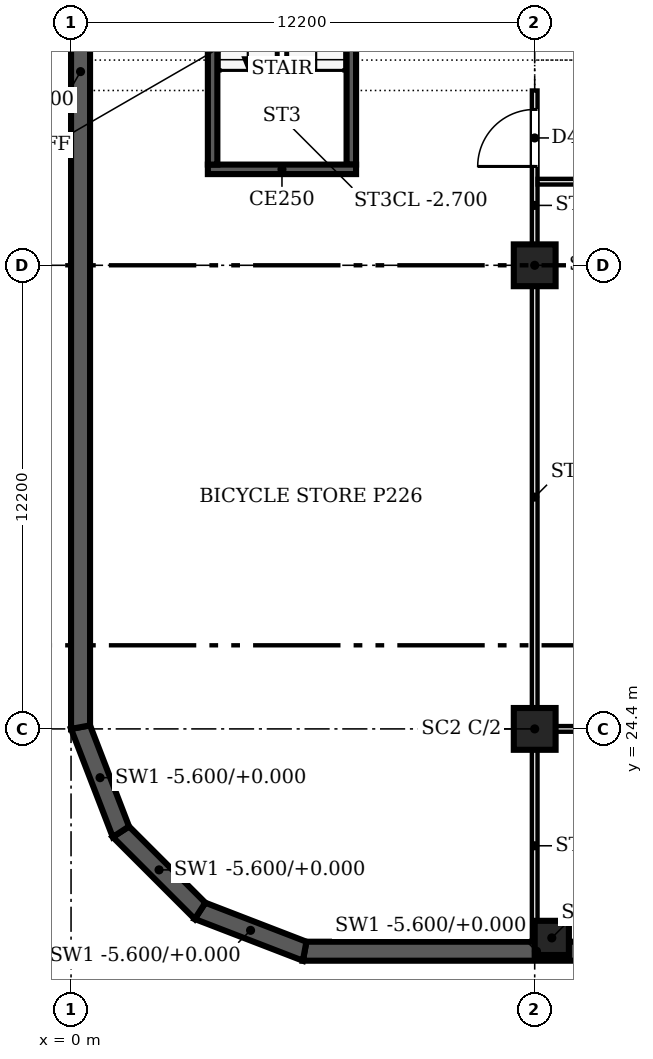
"""IFC4 building model, lengths in metres.
Left out: names, types, materials, properties, quantities, classifications, styles, units other than length and angle.
Written with IfcOpenShell. Run it as: python <this file> out.ifc"""

import sys

from ifc_helpers import new_model, si_unit, direction, frame, frame_2d, origin, origin_2d, place, context, subcontext, project, spatial, polyline, rectangle, outline, extrude, source, transform, mapped, element, fill, save


model = new_model("IFC4")
c1 = context("Model", 3, precision=1e-05, world=origin(), true_north=direction((0.0, 1.0)))
c2 = subcontext(c1, "Body", "Model", "MODEL_VIEW")
j1 = project(units=[si_unit("LENGTHUNIT", "METRE"), si_unit("PLANEANGLEUNIT", "RADIAN")], contexts=[c1])
p1 = place(None, origin())
s1 = spatial("IfcSite", under=j1, at=p1, CompositionType="ELEMENT")
p2 = place(p1, origin())
s2 = spatial("IfcBuilding", under=s1, at=p2, CompositionType="ELEMENT")
p3 = place(p2, frame((0.0, 0.0, -5.4)))
s3 = spatial("IfcBuildingStorey", under=s2, at=p3, CompositionType="ELEMENT", Elevation=-5.4)
p4 = place(p3, frame((0.0, 0.0, -0.2)))
e1 = element("IfcWall", 1, at=p4, inside=s3, PredefinedType="SOLIDWALL", context=c2, shape_type="SweptSolid", body=[
    extrude(outline(polyline([(6.1, 18.3), (18.3, 18.3), (18.393, 18.8), (6.193, 18.8), (6.1, 18.3)])), origin(), (0.0, 0.0, 1.0), 5.6),
])
p5 = place(p3, frame((0.0, 0.0, -0.2)))
e2 = element("IfcWall", 2, at=p5, inside=s3, PredefinedType="SOLIDWALL", context=c2, shape_type="SweptSolid", body=[
    extrude(outline(polyline([(3.254, 19.398), (6.1, 18.3), (6.193, 18.8), (3.533, 19.826), (3.254, 19.398)])), origin(), (0.0, 0.0, 1.0), 5.6),
])
p6 = place(p3, frame((0.0, 0.0, -0.2)))
e3 = element("IfcWall", 3, at=p6, inside=s3, PredefinedType="SOLIDWALL", context=c2, shape_type="SweptSolid", body=[
    extrude(outline(polyline([(1.098, 21.554), (3.254, 19.398), (3.533, 19.826), (1.526, 21.833), (1.098, 21.554)])), origin(), (0.0, 0.0, 1.0), 5.6),
])
p7 = place(p3, frame((0.0, 0.0, -0.2)))
e4 = element("IfcWall", 4, at=p7, inside=s3, PredefinedType="SOLIDWALL", context=c2, shape_type="SweptSolid", body=[
    extrude(outline(polyline([(0.0, 24.4), (1.098, 21.554), (1.526, 21.833), (0.5, 24.493), (0.0, 24.4)])), origin(), (0.0, 0.0, 1.0), 5.6),
])
p8 = place(p3, frame((0.0, 0.0, -0.2)))
e5 = element("IfcWall", 5, at=p8, inside=s3, PredefinedType="SOLIDWALL", context=c2, shape_type="SweptSolid", body=[
    extrude(outline(polyline([(0.0, 24.4), (0.5, 24.493), (0.5, 58.9), (0.0, 59.4), (0.0, 24.4)])), origin(), (0.0, 0.0, 1.0), 5.6),
])
for number, where, z_axis, x_axis in (
    (6, (12.2, 24.4, 0.0), (0.0, 0.0, 1.0), (1.0, 0.0, 0.0)),
    (7, (12.2, 36.6, 0.0), (0.0, 0.0, 1.0), (1.0, 0.0, 0.0)),
):
    element("IfcColumn", number, at=place(p3, frame(where, z_axis=z_axis, x_axis=x_axis)), inside=s3, PredefinedType="COLUMN", context=c2, shape_type="SweptSolid", body=[
        extrude(rectangle(XDim=1.1, YDim=1.1, at=origin_2d()), origin(), (0.0, 0.0, 1.0), 5.15),
    ])
p9 = place(p3, frame((12.65, 18.9, 0.0), z_axis=(0.0, 0.0, 1.0), x_axis=(1.0, 0.0, 0.0)))
e8 = element("IfcColumn", 8, at=p9, inside=s3, PredefinedType="COLUMN", context=c2, shape_type="SweptSolid", body=[
    extrude(rectangle(XDim=0.9, YDim=0.9, at=origin_2d()), origin(), (0.0, 0.0, 1.0), 5.15),
])
p10 = place(p3, frame((7.5, 39.125, 0.0), z_axis=(0.0, 0.0, 1.0), x_axis=(-1.0, 0.0, 0.0)))
e9 = element("IfcWall", 9, at=p10, inside=s3, PredefinedType="SOLIDWALL", context=c2, shape_type="SweptSolid", body=[
    extrude(rectangle(XDim=3.9, YDim=0.25, at=frame_2d((1.95, 0.0))), origin(), (0.0, 0.0, 1.0), 5.4),
])
p11 = place(p3, frame((3.725, 39.25, 0.0), z_axis=(0.0, 0.0, 1.0), x_axis=(0.0, 1.0, 0.0)))
e10 = element("IfcWall", 10, at=p11, inside=s3, PredefinedType="SOLIDWALL", context=c2, shape_type="SweptSolid", body=[
    extrude(rectangle(XDim=8.0, YDim=0.25, at=frame_2d((4.0, 0.0))), origin(), (0.0, 0.0, 1.0), 5.4),
])
p12 = place(p3, frame((7.375, 47.25, 0.0), z_axis=(0.0, 0.0, 1.0), x_axis=(0.0, -1.0, 0.0)))
e11 = element("IfcWall", 11, at=p12, inside=s3, PredefinedType="SOLIDWALL", context=c2, shape_type="SweptSolid", body=[
    extrude(rectangle(XDim=8.0, YDim=0.25, at=frame_2d((4.0, 0.0))), origin(), (0.0, 0.0, 1.0), 5.4),
])
m1 = source(origin(), c2, "Body", "SweptSolid", [
    extrude(rectangle(XDim=1.2, YDim=2.1, at=frame_2d((0.6, 1.05))), frame((0.0, 0.135, 0.0), z_axis=(0.0, -1.0, 0.0), x_axis=(1.0, 0.0, 0.0)), (0.0, 0.0, 1.0), 0.27),
])
p13 = place(p12, frame((0.15, 0.0, 0.0)))
e12 = element("IfcOpeningElement", 12, at=p13, cuts=e11, PredefinedType="OPENING", context=c2, shape_type="MappedRepresentation", body=[
    mapped(m1, transform((0.0, 0.0, 0.0), scale=1.0)),
])
p14 = place(p3, frame((12.2, 18.8, 0.0), z_axis=(0.0, 0.0, 1.0), x_axis=(0.0, 1.0, 0.0)))
e13 = element("IfcWall", 13, at=p14, inside=s3, PredefinedType="PARTITIONING", context=c2, shape_type="SweptSolid", body=[
    extrude(rectangle(XDim=5.049, YDim=0.15, at=frame_2d((2.524, 0.0))), origin(), (0.0, 0.0, 1.0), 4.315),
])
for number, where, z_axis, x_axis in (
    (14, (12.751, 24.4, 0.0), (0.0, 0.0, 1.0), (1.0, 0.0, 0.0)),
    (15, (12.2, 24.951, 0.0), (0.0, 0.0, 1.0), (0.0, 1.0, 0.0)),
):
    element("IfcWall", number, at=place(p3, frame(where, z_axis=z_axis, x_axis=x_axis)), inside=s3, PredefinedType="PARTITIONING", context=c2, shape_type="SweptSolid", body=[
        extrude(rectangle(XDim=11.098, YDim=0.15, at=frame_2d((5.549, 0.0))), origin(), (0.0, 0.0, 1.0), 4.315),
    ])
p15 = place(p3, frame((12.2, 37.151, 0.0), z_axis=(0.0, 0.0, 1.0), x_axis=(0.0, 1.0, 0.0)))
e16 = element("IfcWall", 16, at=p15, inside=s3, PredefinedType="PARTITIONING", context=c2, shape_type="SweptSolid", body=[
    extrude(rectangle(XDim=4.049, YDim=0.15, at=frame_2d((2.024, 0.0))), origin(), (0.0, 0.0, 1.0), 4.315),
])
m2 = source(origin(), c2, "Body", "SweptSolid", [
    extrude(rectangle(XDim=1.5, YDim=2.1, at=frame_2d((0.75, 1.05))), frame((0.0, 0.085, 0.0), z_axis=(0.0, -1.0, 0.0), x_axis=(1.0, 0.0, 0.0)), (0.0, 0.0, 1.0), 0.17),
])
p16 = place(p15, frame((2.05, 0.0, 0.0)))
e17 = element("IfcOpeningElement", 17, at=p16, cuts=e16, PredefinedType="OPENING", context=c2, shape_type="MappedRepresentation", body=[
    mapped(m2, transform((0.0, 0.0, 0.0), scale=1.0)),
])
p17 = place(p3, frame((24.324, 38.8, 0.0), z_axis=(0.0, 0.0, 1.0), x_axis=(-1.0, 0.0, 0.0)))
e18 = element("IfcWall", 18, at=p17, inside=s3, PredefinedType="PARTITIONING", context=c2, shape_type="SweptSolid", body=[
    extrude(rectangle(XDim=12.048, YDim=0.15, at=frame_2d((6.024, 0.0))), origin(), (0.0, 0.0, 1.0), 4.315),
])
m3 = source(origin(), c2, "Body", "SweptSolid", [
    extrude(rectangle(XDim=1.2, YDim=2.1, at=frame_2d((0.6, 1.05))), frame((0.0, 0.085, 0.0), z_axis=(0.0, -1.0, 0.0), x_axis=(1.0, 0.0, 0.0)), (0.0, 0.0, 1.0), 0.17),
])
p18 = place(p17, frame((5.448, 0.0, 0.0)))
e19 = element("IfcOpeningElement", 19, at=p18, cuts=e18, PredefinedType="OPENING", context=c2, shape_type="MappedRepresentation", body=[
    mapped(m3, transform((0.0, 0.0, 0.0), scale=1.0)),
])
m4 = source(origin(), c2, "Body", "SweptSolid", [
    extrude(rectangle(XDim=1.5, YDim=2.1, at=frame_2d((0.75, 1.05))), frame((0.0, 0.025, 0.0), z_axis=(0.0, -1.0, 0.0), x_axis=(1.0, 0.0, 0.0)), (0.0, 0.0, 1.0), 0.05),
])
p19 = place(p16, origin())
e20 = element("IfcDoor", 20, at=p19, inside=s3, OperationType="SINGLE_SWING_LEFT", PredefinedType="DOOR", context=c2, shape_type="MappedRepresentation", body=[
    mapped(m4, transform((0.0, 0.0, 0.0), scale=1.0)),
])
fill(e17, e20)
save(model, sys.argv[1])
